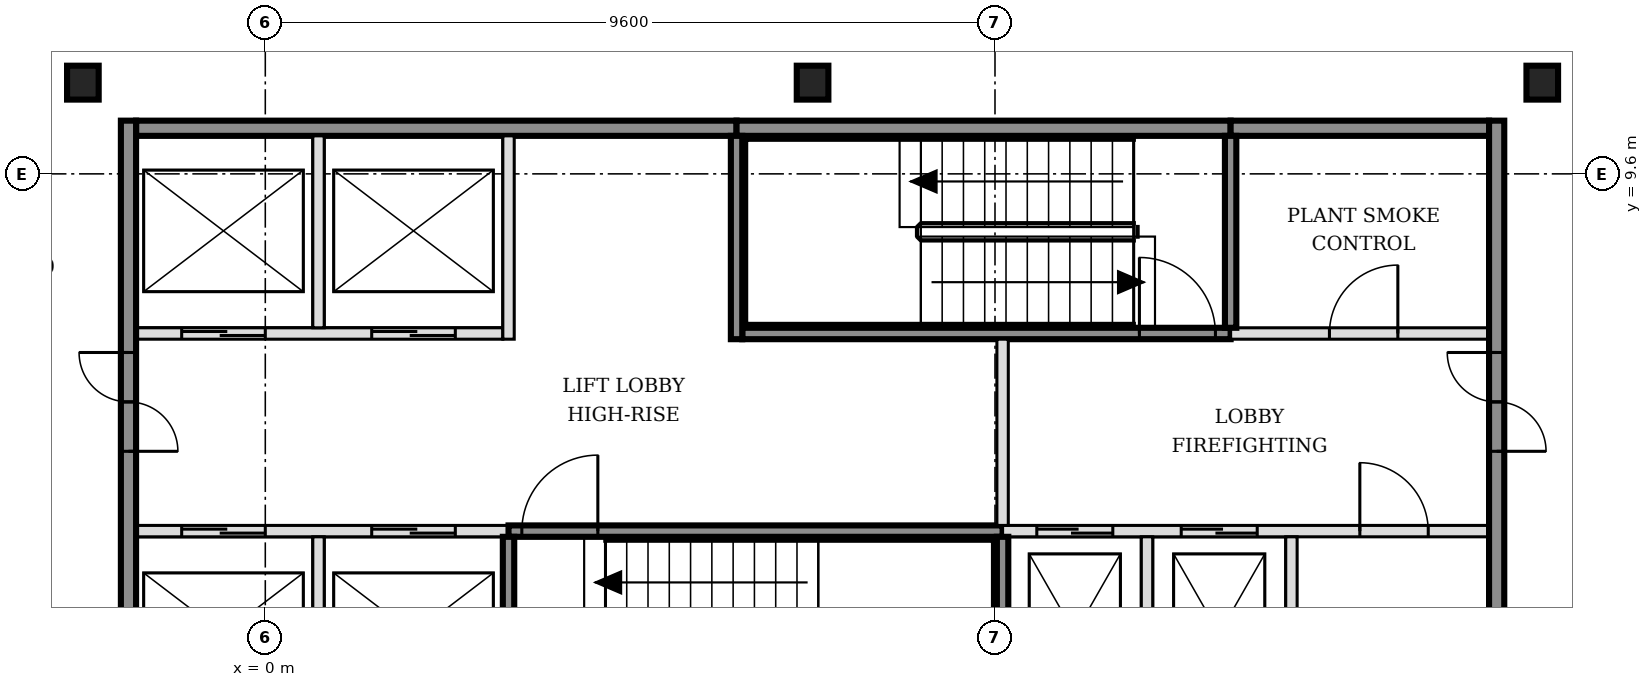
"""IFC4 building model, lengths in metres.
Left out: names, types, materials, properties, quantities, classifications, styles, units other than length and angle.
Written with IfcOpenShell. Run it as: python <this file> out.ifc"""

import sys

from ifc_helpers import new_model, si_unit, direction, frame, frame_2d, origin, origin_2d, place, context, subcontext, project, spatial, rectangle, i_section, extrude, element, fill, save


model = new_model("IFC4")
c1 = context("Model", 3, precision=1e-05, world=origin(), true_north=direction((0.0, 1.0)))
c2 = subcontext(c1, "Body", "Model", "MODEL_VIEW")
j1 = project(units=[si_unit("LENGTHUNIT", "METRE"), si_unit("PLANEANGLEUNIT", "RADIAN")], contexts=[c1])
p1 = place(None, origin())
s1 = spatial("IfcSite", under=j1, at=p1, CompositionType="ELEMENT")
p2 = place(p1, origin())
s2 = spatial("IfcBuilding", under=s1, at=p2, CompositionType="ELEMENT")
p3 = place(p2, frame((0.0, 0.0, 165.0)))
s3 = spatial("IfcBuildingStorey", under=s2, at=p3, CompositionType="ELEMENT", Elevation=165.0)
for number, where, z_axis, x_axis in (
    (1, (-2.4, 10.8, -0.15), (0.0, 0.0, 1.0), (1.0, 0.0, 0.0)),
    (2, (7.2, 10.8, -0.15), (0.0, 0.0, 1.0), (1.0, 0.0, 0.0)),
    (3, (16.8, 10.8, -0.15), (0.0, 0.0, 1.0), (1.0, 0.0, 0.0)),
):
    element("IfcColumn", number, at=place(p3, frame(where, z_axis=z_axis, x_axis=x_axis)), inside=s3, PredefinedType="COLUMN", context=c2, shape_type="SweptSolid", body=[
        extrude(i_section(OverallWidth=0.416, OverallDepth=0.446, WebThickness=0.039, FlangeThickness=0.063, FilletRadius=0.015, at=origin_2d()), origin(), (0.0, 0.0, 1.0), 3.6),
    ])
p4 = place(p3, frame((-1.7, 4.9, 0.0), z_axis=(0.0, 0.0, 1.0), x_axis=(1.0, 0.0, 0.0)))
e4 = element("IfcWall", 4, at=p4, inside=s3, PredefinedType="SOLIDWALL", context=c2, shape_type="SweptSolid", body=[
    extrude(rectangle(XDim=4.9, YDim=0.15, at=frame_2d((2.45, 0.0))), origin(), (0.0, 0.0, 1.0), 3.45),
])
p5 = place(p4, frame((0.6, 0.0, 0.0)))
e5 = element("IfcOpeningElement", 5, at=p5, cuts=e4, PredefinedType="OPENING", context=c2, shape_type="SweptSolid", body=[
    extrude(rectangle(XDim=1.1, YDim=2.1, at=frame_2d((0.55, 1.05))), frame((0.0, 0.085, 0.0), z_axis=(0.0, -1.0, 0.0), x_axis=(1.0, 0.0, 0.0)), (0.0, 0.0, 1.0), 0.17),
])
p6 = place(p4, frame((3.1, 0.0, 0.0)))
e6 = element("IfcOpeningElement", 6, at=p6, cuts=e4, PredefinedType="OPENING", context=c2, shape_type="SweptSolid", body=[
    extrude(rectangle(XDim=1.1, YDim=2.1, at=frame_2d((0.55, 1.05))), frame((0.0, 0.085, 0.0), z_axis=(0.0, -1.0, 0.0), x_axis=(1.0, 0.0, 0.0)), (0.0, 0.0, 1.0), 0.17),
])
p7 = place(p3, frame((3.2, 4.9, 0.0), z_axis=(0.0, 0.0, 1.0), x_axis=(1.0, 0.0, 0.0)))
e7 = element("IfcWall", 7, at=p7, inside=s3, PredefinedType="SOLIDWALL", context=c2, shape_type="SweptSolid", body=[
    extrude(rectangle(XDim=6.5, YDim=0.15, at=frame_2d((3.25, 0.0))), origin(), (0.0, 0.0, 1.0), 3.45),
])
p8 = place(p7, frame((0.175, 0.0, 0.0)))
e8 = element("IfcOpeningElement", 8, at=p8, cuts=e7, PredefinedType="OPENING", context=c2, shape_type="SweptSolid", body=[
    extrude(rectangle(XDim=1.0, YDim=2.1, at=frame_2d((0.5, 1.05))), frame((0.0, 0.085, 0.0), z_axis=(0.0, -1.0, 0.0), x_axis=(1.0, 0.0, 0.0)), (0.0, 0.0, 1.0), 0.17),
])
p9 = place(p3, frame((9.7, 4.9, 0.0), z_axis=(0.0, 0.0, 1.0), x_axis=(1.0, 0.0, 0.0)))
e9 = element("IfcWall", 9, at=p9, inside=s3, PredefinedType="SOLIDWALL", context=c2, shape_type="SweptSolid", body=[
    extrude(rectangle(XDim=6.4, YDim=0.15, at=frame_2d((3.2, 0.0))), origin(), (0.0, 0.0, 1.0), 3.45),
])
p10 = place(p9, frame((0.45, 0.0, 0.0)))
e10 = element("IfcOpeningElement", 10, at=p10, cuts=e9, PredefinedType="OPENING", context=c2, shape_type="SweptSolid", body=[
    extrude(rectangle(XDim=1.0, YDim=2.1, at=frame_2d((0.5, 1.05))), frame((0.0, 0.085, 0.0), z_axis=(0.0, -1.0, 0.0), x_axis=(1.0, 0.0, 0.0)), (0.0, 0.0, 1.0), 0.17),
])
p11 = place(p9, frame((2.35, 0.0, 0.0)))
e11 = element("IfcOpeningElement", 11, at=p11, cuts=e9, PredefinedType="OPENING", context=c2, shape_type="SweptSolid", body=[
    extrude(rectangle(XDim=1.0, YDim=2.1, at=frame_2d((0.5, 1.05))), frame((0.0, 0.085, 0.0), z_axis=(0.0, -1.0, 0.0), x_axis=(1.0, 0.0, 0.0)), (0.0, 0.0, 1.0), 0.17),
])
p12 = place(p9, frame((4.7, 0.0, 0.0)))
e12 = element("IfcOpeningElement", 12, at=p12, cuts=e9, PredefinedType="OPENING", context=c2, shape_type="SweptSolid", body=[
    extrude(rectangle(XDim=0.9, YDim=2.1, at=frame_2d((0.45, 1.05))), frame((0.0, 0.085, 0.0), z_axis=(0.0, -1.0, 0.0), x_axis=(1.0, 0.0, 0.0)), (0.0, 0.0, 1.0), 0.17),
])
p13 = place(p3, frame((-1.7, 7.5, 0.0), z_axis=(0.0, 0.0, 1.0), x_axis=(1.0, 0.0, 0.0)))
e13 = element("IfcWall", 13, at=p13, inside=s3, PredefinedType="SOLIDWALL", context=c2, shape_type="SweptSolid", body=[
    extrude(rectangle(XDim=4.825, YDim=0.15, at=frame_2d((2.413, 0.0))), origin(), (0.0, 0.0, 1.0), 3.45),
])
p14 = place(p13, frame((0.6, 0.0, 0.0)))
e14 = element("IfcOpeningElement", 14, at=p14, cuts=e13, PredefinedType="OPENING", context=c2, shape_type="SweptSolid", body=[
    extrude(rectangle(XDim=1.1, YDim=2.1, at=frame_2d((0.55, 1.05))), frame((0.0, 0.085, 0.0), z_axis=(0.0, -1.0, 0.0), x_axis=(1.0, 0.0, 0.0)), (0.0, 0.0, 1.0), 0.17),
])
p15 = place(p13, frame((3.1, 0.0, 0.0)))
e15 = element("IfcOpeningElement", 15, at=p15, cuts=e13, PredefinedType="OPENING", context=c2, shape_type="SweptSolid", body=[
    extrude(rectangle(XDim=1.1, YDim=2.1, at=frame_2d((0.55, 1.05))), frame((0.0, 0.085, 0.0), z_axis=(0.0, -1.0, 0.0), x_axis=(1.0, 0.0, 0.0)), (0.0, 0.0, 1.0), 0.17),
])
p16 = place(p3, frame((6.275, 7.5, 0.0), z_axis=(0.0, 0.0, 1.0), x_axis=(1.0, 0.0, 0.0)))
e16 = element("IfcWall", 16, at=p16, inside=s3, PredefinedType="SOLIDWALL", context=c2, shape_type="SweptSolid", body=[
    extrude(rectangle(XDim=6.425, YDim=0.15, at=frame_2d((3.212, 0.0))), origin(), (0.0, 0.0, 1.0), 3.45),
])
p17 = place(p16, frame((5.225, 0.0, 0.0)))
e17 = element("IfcOpeningElement", 17, at=p17, cuts=e16, PredefinedType="OPENING", context=c2, shape_type="SweptSolid", body=[
    extrude(rectangle(XDim=1.0, YDim=2.1, at=frame_2d((0.5, 1.05))), frame((0.0, 0.085, 0.0), z_axis=(0.0, -1.0, 0.0), x_axis=(1.0, 0.0, 0.0)), (0.0, 0.0, 1.0), 0.17),
])
p18 = place(p3, frame((12.7, 7.5, 0.0), z_axis=(0.0, 0.0, 1.0), x_axis=(1.0, 0.0, 0.0)))
e18 = element("IfcWall", 18, at=p18, inside=s3, PredefinedType="SOLIDWALL", context=c2, shape_type="SweptSolid", body=[
    extrude(rectangle(XDim=3.4, YDim=0.15, at=frame_2d((1.7, 0.0))), origin(), (0.0, 0.0, 1.0), 3.45),
])
p19 = place(p18, frame((1.3, 0.0, 0.0)))
e19 = element("IfcOpeningElement", 19, at=p19, cuts=e18, PredefinedType="OPENING", context=c2, shape_type="SweptSolid", body=[
    extrude(rectangle(XDim=0.9, YDim=2.1, at=frame_2d((0.45, 1.05))), frame((0.0, 0.085, 0.0), z_axis=(0.0, -1.0, 0.0), x_axis=(1.0, 0.0, 0.0)), (0.0, 0.0, 1.0), 0.17),
])
p20 = place(p3, frame((-1.7, 10.2, 0.0), z_axis=(0.0, 0.0, 1.0), x_axis=(1.0, 0.0, 0.0)))
e20 = element("IfcWall", 20, at=p20, inside=s3, PredefinedType="SOLIDWALL", context=c2, shape_type="SweptSolid", body=[
    extrude(rectangle(XDim=7.9, YDim=0.2, at=frame_2d((3.95, 0.0))), origin(), (0.0, 0.0, 1.0), 3.45),
])
p21 = place(p3, frame((6.2, 10.2, 0.0), z_axis=(0.0, 0.0, 1.0), x_axis=(1.0, 0.0, 0.0)))
e21 = element("IfcWall", 21, at=p21, inside=s3, PredefinedType="SOLIDWALL", context=c2, shape_type="SweptSolid", body=[
    extrude(rectangle(XDim=6.5, YDim=0.2, at=frame_2d((3.25, 0.0))), origin(), (0.0, 0.0, 1.0), 3.45),
])
p22 = place(p3, frame((12.7, 10.2, 0.0), z_axis=(0.0, 0.0, 1.0), x_axis=(1.0, 0.0, 0.0)))
e22 = element("IfcWall", 22, at=p22, inside=s3, PredefinedType="SOLIDWALL", context=c2, shape_type="SweptSolid", body=[
    extrude(rectangle(XDim=3.4, YDim=0.2, at=frame_2d((1.7, 0.0))), origin(), (0.0, 0.0, 1.0), 3.45),
])
p23 = place(p3, frame((-1.8, -5.5, 0.0), z_axis=(0.0, 0.0, 1.0), x_axis=(0.0, 1.0, 0.0)))
e23 = element("IfcWall", 23, at=p23, inside=s3, PredefinedType="SOLIDWALL", context=c2, shape_type="SweptSolid", body=[
    extrude(rectangle(XDim=15.8, YDim=0.2, at=frame_2d((7.9, 0.0))), origin(), (0.0, 0.0, 1.0), 3.45),
])
p24 = place(p23, frame((3.05, 0.0, 0.0)))
e24 = element("IfcOpeningElement", 24, at=p24, cuts=e23, PredefinedType="OPENING", context=c2, shape_type="SweptSolid", body=[
    extrude(rectangle(XDim=1.3, YDim=2.1, at=frame_2d((0.65, 1.05))), frame((0.0, 0.11, 0.0), z_axis=(0.0, -1.0, 0.0), x_axis=(1.0, 0.0, 0.0)), (0.0, 0.0, 1.0), 0.22),
])
p25 = place(p23, frame((11.45, 0.0, 0.0)))
e25 = element("IfcOpeningElement", 25, at=p25, cuts=e23, PredefinedType="OPENING", context=c2, shape_type="SweptSolid", body=[
    extrude(rectangle(XDim=1.3, YDim=2.1, at=frame_2d((0.65, 1.05))), frame((0.0, 0.11, 0.0), z_axis=(0.0, -1.0, 0.0), x_axis=(1.0, 0.0, 0.0)), (0.0, 0.0, 1.0), 0.22),
])
p26 = place(p3, frame((0.7, 2.275, 0.0), z_axis=(0.0, 0.0, 1.0), x_axis=(0.0, 1.0, 0.0)))
e26 = element("IfcWall", 26, at=p26, inside=s3, PredefinedType="SOLIDWALL", context=c2, shape_type="SweptSolid", body=[
    extrude(rectangle(XDim=2.55, YDim=0.15, at=frame_2d((1.275, 0.0))), origin(), (0.0, 0.0, 1.0), 3.45),
])
p27 = place(p3, frame((0.7, 7.575, 0.0), z_axis=(0.0, 0.0, 1.0), x_axis=(0.0, 1.0, 0.0)))
e27 = element("IfcWall", 27, at=p27, inside=s3, PredefinedType="SOLIDWALL", context=c2, shape_type="SweptSolid", body=[
    extrude(rectangle(XDim=2.525, YDim=0.15, at=frame_2d((1.263, 0.0))), origin(), (0.0, 0.0, 1.0), 3.45),
])
p28 = place(p3, frame((3.2, 2.275, 0.0), z_axis=(0.0, 0.0, 1.0), x_axis=(0.0, 1.0, 0.0)))
e28 = element("IfcWall", 28, at=p28, inside=s3, PredefinedType="SOLIDWALL", context=c2, shape_type="SweptSolid", body=[
    extrude(rectangle(XDim=2.55, YDim=0.15, at=frame_2d((1.275, 0.0))), origin(), (0.0, 0.0, 1.0), 3.45),
])
for number, where, z_axis, x_axis in (
    (29, (3.2, 7.425, 0.0), (0.0, 0.0, 1.0), (0.0, 1.0, 0.0)),
    (30, (6.2, 7.425, 0.0), (0.0, 0.0, 1.0), (0.0, 1.0, 0.0)),
):
    element("IfcWall", number, at=place(p3, frame(where, z_axis=z_axis, x_axis=x_axis)), inside=s3, PredefinedType="SOLIDWALL", context=c2, shape_type="SweptSolid", body=[
        extrude(rectangle(XDim=2.675, YDim=0.15, at=frame_2d((1.337, 0.0))), origin(), (0.0, 0.0, 1.0), 3.45),
    ])
p29 = place(p3, frame((9.7, 2.275, 0.0), z_axis=(0.0, 0.0, 1.0), x_axis=(0.0, 1.0, 0.0)))
e31 = element("IfcWall", 31, at=p29, inside=s3, PredefinedType="SOLIDWALL", context=c2, shape_type="SweptSolid", body=[
    extrude(rectangle(XDim=2.55, YDim=0.15, at=frame_2d((1.275, 0.0))), origin(), (0.0, 0.0, 1.0), 3.45),
])
p30 = place(p3, frame((9.7, 4.975, 0.0), z_axis=(0.0, 0.0, 1.0), x_axis=(0.0, 1.0, 0.0)))
e32 = element("IfcWall", 32, at=p30, inside=s3, PredefinedType="SOLIDWALL", context=c2, shape_type="SweptSolid", body=[
    extrude(rectangle(XDim=2.45, YDim=0.15, at=frame_2d((1.225, 0.0))), origin(), (0.0, 0.0, 1.0), 3.45),
])
p31 = place(p3, frame((11.6, 2.275, 0.0), z_axis=(0.0, 0.0, 1.0), x_axis=(0.0, 1.0, 0.0)))
e33 = element("IfcWall", 33, at=p31, inside=s3, PredefinedType="SOLIDWALL", context=c2, shape_type="SweptSolid", body=[
    extrude(rectangle(XDim=2.55, YDim=0.15, at=frame_2d((1.275, 0.0))), origin(), (0.0, 0.0, 1.0), 3.45),
])
p32 = place(p3, frame((12.7, 7.575, 0.0), z_axis=(0.0, 0.0, 1.0), x_axis=(0.0, 1.0, 0.0)))
e34 = element("IfcWall", 34, at=p32, inside=s3, PredefinedType="SOLIDWALL", context=c2, shape_type="SweptSolid", body=[
    extrude(rectangle(XDim=2.525, YDim=0.15, at=frame_2d((1.263, 0.0))), origin(), (0.0, 0.0, 1.0), 3.45),
])
p33 = place(p3, frame((13.5, 2.275, 0.0), z_axis=(0.0, 0.0, 1.0), x_axis=(0.0, 1.0, 0.0)))
e35 = element("IfcWall", 35, at=p33, inside=s3, PredefinedType="SOLIDWALL", context=c2, shape_type="SweptSolid", body=[
    extrude(rectangle(XDim=2.55, YDim=0.15, at=frame_2d((1.275, 0.0))), origin(), (0.0, 0.0, 1.0), 3.45),
])
p34 = place(p3, frame((16.2, -5.5, 0.0), z_axis=(0.0, 0.0, 1.0), x_axis=(0.0, 1.0, 0.0)))
e36 = element("IfcWall", 36, at=p34, inside=s3, PredefinedType="SOLIDWALL", context=c2, shape_type="SweptSolid", body=[
    extrude(rectangle(XDim=15.8, YDim=0.2, at=frame_2d((7.9, 0.0))), origin(), (0.0, 0.0, 1.0), 3.45),
])
p35 = place(p34, frame((3.05, 0.0, 0.0)))
e37 = element("IfcOpeningElement", 37, at=p35, cuts=e36, PredefinedType="OPENING", context=c2, shape_type="SweptSolid", body=[
    extrude(rectangle(XDim=1.3, YDim=2.1, at=frame_2d((0.65, 1.05))), frame((0.0, 0.11, 0.0), z_axis=(0.0, -1.0, 0.0), x_axis=(1.0, 0.0, 0.0)), (0.0, 0.0, 1.0), 0.22),
])
p36 = place(p34, frame((11.45, 0.0, 0.0)))
e38 = element("IfcOpeningElement", 38, at=p36, cuts=e36, PredefinedType="OPENING", context=c2, shape_type="SweptSolid", body=[
    extrude(rectangle(XDim=1.3, YDim=2.1, at=frame_2d((0.65, 1.05))), frame((0.0, 0.11, 0.0), z_axis=(0.0, -1.0, 0.0), x_axis=(1.0, 0.0, 0.0)), (0.0, 0.0, 1.0), 0.22),
])
p37 = place(p5, origin())
e39 = element("IfcDoor", 39, at=p37, inside=s3, OperationType="DOUBLE_DOOR_SLIDING", PredefinedType="DOOR", context=c2, shape_type="SweptSolid", body=[
    extrude(rectangle(XDim=1.1, YDim=2.1, at=frame_2d((0.55, 1.05))), frame((0.0, 0.025, 0.0), z_axis=(0.0, -1.0, 0.0), x_axis=(1.0, 0.0, 0.0)), (0.0, 0.0, 1.0), 0.05),
])
fill(e5, e39)
p38 = place(p6, origin())
e40 = element("IfcDoor", 40, at=p38, inside=s3, OperationType="DOUBLE_DOOR_SLIDING", PredefinedType="DOOR", context=c2, shape_type="SweptSolid", body=[
    extrude(rectangle(XDim=1.1, YDim=2.1, at=frame_2d((0.55, 1.05))), frame((0.0, 0.025, 0.0), z_axis=(0.0, -1.0, 0.0), x_axis=(1.0, 0.0, 0.0)), (0.0, 0.0, 1.0), 0.05),
])
fill(e6, e40)
p39 = place(p14, origin())
e41 = element("IfcDoor", 41, at=p39, inside=s3, OperationType="DOUBLE_DOOR_SLIDING", PredefinedType="DOOR", context=c2, shape_type="SweptSolid", body=[
    extrude(rectangle(XDim=1.1, YDim=2.1, at=frame_2d((0.55, 1.05))), frame((0.0, 0.025, 0.0), z_axis=(0.0, -1.0, 0.0), x_axis=(1.0, 0.0, 0.0)), (0.0, 0.0, 1.0), 0.05),
])
fill(e14, e41)
p40 = place(p15, origin())
e42 = element("IfcDoor", 42, at=p40, inside=s3, OperationType="DOUBLE_DOOR_SLIDING", PredefinedType="DOOR", context=c2, shape_type="SweptSolid", body=[
    extrude(rectangle(XDim=1.1, YDim=2.1, at=frame_2d((0.55, 1.05))), frame((0.0, 0.025, 0.0), z_axis=(0.0, -1.0, 0.0), x_axis=(1.0, 0.0, 0.0)), (0.0, 0.0, 1.0), 0.05),
])
fill(e15, e42)
p41 = place(p10, origin())
e43 = element("IfcDoor", 43, at=p41, inside=s3, OperationType="DOUBLE_DOOR_SLIDING", PredefinedType="DOOR", context=c2, shape_type="SweptSolid", body=[
    extrude(rectangle(XDim=1.0, YDim=2.1, at=frame_2d((0.5, 1.05))), frame((0.0, 0.025, 0.0), z_axis=(0.0, -1.0, 0.0), x_axis=(1.0, 0.0, 0.0)), (0.0, 0.0, 1.0), 0.05),
])
fill(e10, e43)
p42 = place(p11, origin())
e44 = element("IfcDoor", 44, at=p42, inside=s3, OperationType="DOUBLE_DOOR_SLIDING", PredefinedType="DOOR", context=c2, shape_type="SweptSolid", body=[
    extrude(rectangle(XDim=1.0, YDim=2.1, at=frame_2d((0.5, 1.05))), frame((0.0, 0.025, 0.0), z_axis=(0.0, -1.0, 0.0), x_axis=(1.0, 0.0, 0.0)), (0.0, 0.0, 1.0), 0.05),
])
fill(e11, e44)
p43 = place(p8, origin())
e45 = element("IfcDoor", 45, at=p43, inside=s3, OperationType="SINGLE_SWING_RIGHT", PredefinedType="DOOR", context=c2, shape_type="SweptSolid", body=[
    extrude(rectangle(XDim=1.0, YDim=2.1, at=frame_2d((0.5, 1.05))), frame((0.0, 0.025, 0.0), z_axis=(0.0, -1.0, 0.0), x_axis=(1.0, 0.0, 0.0)), (0.0, 0.0, 1.0), 0.05),
])
fill(e8, e45)
p44 = place(p17, origin())
e46 = element("IfcDoor", 46, at=p44, inside=s3, OperationType="SINGLE_SWING_LEFT", PredefinedType="DOOR", context=c2, shape_type="SweptSolid", body=[
    extrude(rectangle(XDim=1.0, YDim=2.1, at=frame_2d((0.5, 1.05))), frame((0.0, 0.025, 0.0), z_axis=(0.0, -1.0, 0.0), x_axis=(1.0, 0.0, 0.0)), (0.0, 0.0, 1.0), 0.05),
])
fill(e17, e46)
p45 = place(p25, origin())
e47 = element("IfcDoor", 47, at=p45, inside=s3, OperationType="DOUBLE_DOOR_SINGLE_SWING", PredefinedType="DOOR", context=c2, shape_type="SweptSolid", body=[
    extrude(rectangle(XDim=1.3, YDim=2.1, at=frame_2d((0.65, 1.05))), frame((0.0, 0.025, 0.0), z_axis=(0.0, -1.0, 0.0), x_axis=(1.0, 0.0, 0.0)), (0.0, 0.0, 1.0), 0.05),
])
fill(e25, e47)
p46 = place(p36, origin())
e48 = element("IfcDoor", 48, at=p46, inside=s3, OperationType="DOUBLE_DOOR_SINGLE_SWING", PredefinedType="DOOR", context=c2, shape_type="SweptSolid", body=[
    extrude(rectangle(XDim=1.3, YDim=2.1, at=frame_2d((0.65, 1.05))), frame((0.0, 0.025, 0.0), z_axis=(0.0, -1.0, 0.0), x_axis=(1.0, 0.0, 0.0)), (0.0, 0.0, 1.0), 0.05),
])
fill(e38, e48)
p47 = place(p12, origin())
e49 = element("IfcDoor", 49, at=p47, inside=s3, OperationType="SINGLE_SWING_LEFT", PredefinedType="DOOR", context=c2, shape_type="SweptSolid", body=[
    extrude(rectangle(XDim=0.9, YDim=2.1, at=frame_2d((0.45, 1.05))), frame((0.0, 0.025, 0.0), z_axis=(0.0, -1.0, 0.0), x_axis=(1.0, 0.0, 0.0)), (0.0, 0.0, 1.0), 0.05),
])
fill(e12, e49)
p48 = place(p19, origin())
e50 = element("IfcDoor", 50, at=p48, inside=s3, OperationType="SINGLE_SWING_RIGHT", PredefinedType="DOOR", context=c2, shape_type="SweptSolid", body=[
    extrude(rectangle(XDim=0.9, YDim=2.1, at=frame_2d((0.45, 1.05))), frame((0.0, 0.025, 0.0), z_axis=(0.0, -1.0, 0.0), x_axis=(1.0, 0.0, 0.0)), (0.0, 0.0, 1.0), 0.05),
])
fill(e19, e50)
save(model, sys.argv[1])
